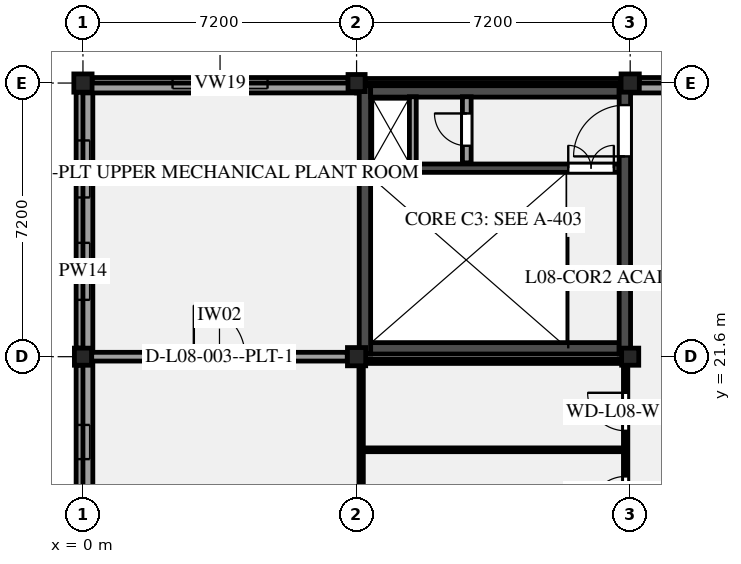
"""IFC4 building model, lengths in metres.
Left out: names, types, materials, properties, quantities, classifications, styles, units other than length and angle.
Written with IfcOpenShell. Run it as: python <this file> out.ifc"""

import sys

from ifc_helpers import new_model, si_unit, direction, frame, frame_2d, origin, origin_2d, place, context, subcontext, project, spatial, rectangle, extrude, element, fill, save


model = new_model("IFC4")
c1 = context("Model", 3, precision=1e-05, world=origin(), true_north=direction((0.0, 1.0)))
c2 = subcontext(c1, "Body", "Model", "MODEL_VIEW")
j1 = project(units=[si_unit("LENGTHUNIT", "METRE"), si_unit("PLANEANGLEUNIT", "RADIAN")], contexts=[c1])
p1 = place(None, origin())
s1 = spatial("IfcSite", under=j1, at=p1, CompositionType="ELEMENT")
p2 = place(p1, origin())
s2 = spatial("IfcBuilding", under=s1, at=p2, CompositionType="ELEMENT")
p3 = place(p2, frame((0.0, 0.0, 34.5)))
s3 = spatial("IfcBuildingStorey", under=s2, at=p3, CompositionType="ELEMENT", Elevation=34.5)
p4 = place(p3, frame((0.0, 21.6, 0.0), z_axis=(0.0, 0.0, 1.0), x_axis=(1.0, 0.0, 0.0)))
e1 = element("IfcColumn", 1, at=p4, inside=s3, PredefinedType="COLUMN", context=c2, shape_type="SweptSolid", body=[
    extrude(rectangle(XDim=0.45, YDim=0.45, at=origin_2d()), origin(), (0.0, 0.0, 1.0), 3.695),
])
for number, where, z_axis, x_axis in (
    (2, (0.0, 28.8, 0.0), (0.0, 0.0, 1.0), (1.0, 0.0, 0.0)),
    (3, (7.2, 21.6, 0.0), (0.0, 0.0, 1.0), (1.0, 0.0, 0.0)),
):
    element("IfcColumn", number, at=place(p3, frame(where, z_axis=z_axis, x_axis=x_axis)), inside=s3, PredefinedType="COLUMN", context=c2, shape_type="SweptSolid", body=[
        extrude(rectangle(XDim=0.48, YDim=0.48, at=origin_2d()), origin(), (0.0, 0.0, 1.0), 3.695),
    ])
for number, where, z_axis, x_axis in (
    (4, (7.2, 28.8, 0.0), (0.0, 0.0, 1.0), (1.0, 0.0, 0.0)),
    (5, (14.4, 21.6, 0.0), (0.0, 0.0, 1.0), (1.0, 0.0, 0.0)),
):
    element("IfcColumn", number, at=place(p3, frame(where, z_axis=z_axis, x_axis=x_axis)), inside=s3, PredefinedType="COLUMN", context=c2, shape_type="SweptSolid", body=[
        extrude(rectangle(XDim=0.45, YDim=0.45, at=origin_2d()), origin(), (0.0, 0.0, 1.0), 3.695),
    ])
p5 = place(p3, frame((14.4, 28.8, 0.0), z_axis=(0.0, 0.0, 1.0), x_axis=(1.0, 0.0, 0.0)))
e6 = element("IfcColumn", 6, at=p5, inside=s3, PredefinedType="COLUMN", context=c2, shape_type="SweptSolid", body=[
    extrude(rectangle(XDim=0.48, YDim=0.48, at=origin_2d()), origin(), (0.0, 0.0, 1.0), 3.695),
])
p6 = place(p3, frame((0.0, 14.64, 0.0), z_axis=(0.0, 0.0, 1.0), x_axis=(0.0, 1.0, 0.0)))
e7 = element("IfcWall", 7, at=p6, inside=s3, PredefinedType="STANDARD", context=c2, shape_type="SweptSolid", body=[
    extrude(rectangle(XDim=6.735, YDim=0.36, at=frame_2d((3.368, 0.0))), origin(), (0.0, 0.0, 1.0), 2.89),
])
p7 = place(p6, frame((1.571, 0.0, 1.15)))
e8 = element("IfcOpeningElement", 8, at=p7, cuts=e7, PredefinedType="OPENING", context=c2, shape_type="SweptSolid", body=[
    extrude(rectangle(XDim=0.9, YDim=1.3, at=frame_2d((0.45, 0.65))), frame((0.0, 0.19, 0.0), z_axis=(0.0, -1.0, 0.0), x_axis=(1.0, 0.0, 0.0)), (0.0, 0.0, 1.0), 0.38),
])
p8 = place(p6, frame((4.264, 0.0, 1.15)))
e9 = element("IfcOpeningElement", 9, at=p8, cuts=e7, PredefinedType="OPENING", context=c2, shape_type="SweptSolid", body=[
    extrude(rectangle(XDim=0.9, YDim=1.3, at=frame_2d((0.45, 0.65))), frame((0.0, 0.19, 0.0), z_axis=(0.0, -1.0, 0.0), x_axis=(1.0, 0.0, 0.0)), (0.0, 0.0, 1.0), 0.38),
])
p9 = place(p3, frame((0.0, 21.825, 0.0), z_axis=(0.0, 0.0, 1.0), x_axis=(0.0, 1.0, 0.0)))
e10 = element("IfcWall", 10, at=p9, inside=s3, PredefinedType="STANDARD", context=c2, shape_type="SweptSolid", body=[
    extrude(rectangle(XDim=6.735, YDim=0.36, at=frame_2d((3.368, 0.0))), origin(), (0.0, 0.0, 1.0), 2.89),
])
p10 = place(p9, frame((1.271, 0.0, 1.15)))
e11 = element("IfcOpeningElement", 11, at=p10, cuts=e10, PredefinedType="OPENING", context=c2, shape_type="SweptSolid", body=[
    extrude(rectangle(XDim=1.5, YDim=1.2, at=frame_2d((0.75, 0.6))), frame((0.0, 0.19, 0.0), z_axis=(0.0, -1.0, 0.0), x_axis=(1.0, 0.0, 0.0)), (0.0, 0.0, 1.0), 0.38),
])
p11 = place(p9, frame((3.965, 0.0, 1.15)))
e12 = element("IfcOpeningElement", 12, at=p11, cuts=e10, PredefinedType="OPENING", context=c2, shape_type="SweptSolid", body=[
    extrude(rectangle(XDim=1.5, YDim=1.2, at=frame_2d((0.75, 0.6))), frame((0.0, 0.19, 0.0), z_axis=(0.0, -1.0, 0.0), x_axis=(1.0, 0.0, 0.0)), (0.0, 0.0, 1.0), 0.38),
])
p12 = place(p3, frame((0.24, 28.8, 0.0), z_axis=(0.0, 0.0, 1.0), x_axis=(1.0, 0.0, 0.0)))
e13 = element("IfcWall", 13, at=p12, inside=s3, PredefinedType="STANDARD", context=c2, shape_type="SweptSolid", body=[
    extrude(rectangle(XDim=6.735, YDim=0.29, at=frame_2d((3.368, 0.0))), origin(), (0.0, 0.0, 1.0), 2.89),
])
p13 = place(p12, frame((2.117, 0.0, 0.98)))
e14 = element("IfcOpeningElement", 14, at=p13, cuts=e13, PredefinedType="OPENING", context=c2, shape_type="SweptSolid", body=[
    extrude(rectangle(XDim=2.5, YDim=1.35, at=frame_2d((1.25, 0.675))), frame((0.0, 0.155, 0.0), z_axis=(0.0, -1.0, 0.0), x_axis=(1.0, 0.0, 0.0)), (0.0, 0.0, 1.0), 0.31),
])
p14 = place(p3, frame((7.425, 28.8, 0.0), z_axis=(0.0, 0.0, 1.0), x_axis=(1.0, 0.0, 0.0)))
e15 = element("IfcWall", 15, at=p14, inside=s3, PredefinedType="STANDARD", context=c2, shape_type="SweptSolid", body=[
    extrude(rectangle(XDim=6.735, YDim=0.24, at=frame_2d((3.367, 0.0))), origin(), (0.0, 0.0, 1.0), 2.89),
])
p15 = place(p3, frame((14.64, 28.8, 0.0), z_axis=(0.0, 0.0, 1.0), x_axis=(1.0, 0.0, 0.0)))
e16 = element("IfcWall", 16, at=p15, inside=s3, PredefinedType="STANDARD", context=c2, shape_type="SweptSolid", body=[
    extrude(rectangle(XDim=6.735, YDim=0.29, at=frame_2d((3.368, 0.0))), origin(), (0.0, 0.0, 1.0), 2.89),
])
p16 = place(p15, frame((0.968, 0.0, 0.98)))
e17 = element("IfcOpeningElement", 17, at=p16, cuts=e16, PredefinedType="OPENING", context=c2, shape_type="SweptSolid", body=[
    extrude(rectangle(XDim=4.8, YDim=1.5, at=frame_2d((2.4, 0.75))), frame((0.0, 0.155, 0.0), z_axis=(0.0, -1.0, 0.0), x_axis=(1.0, 0.0, 0.0)), (0.0, 0.0, 1.0), 0.31),
])
p17 = place(p3, frame((0.13, 14.4, 3.695), z_axis=(0.0, 0.0, 1.0), x_axis=(0.0, 1.0, 0.0)))
e18 = element("IfcWall", 18, at=p17, inside=s3, PredefinedType="PARAPET", context=c2, shape_type="SweptSolid", body=[
    extrude(rectangle(XDim=7.2, YDim=0.26, at=frame_2d((3.6, 0.0))), origin(), (0.0, 0.0, 1.0), 1.105),
])
for number, where, z_axis, x_axis in (
    (19, (0.13, 21.6, 3.695), (0.0, 0.0, 1.0), (0.0, 1.0, 0.0)),
    (20, (0.0, 28.67, 3.695), (0.0, 0.0, 1.0), (1.0, 0.0, 0.0)),
):
    element("IfcWall", number, at=place(p3, frame(where, z_axis=z_axis, x_axis=x_axis)), inside=s3, PredefinedType="PARAPET", context=c2, shape_type="SweptSolid", body=[
        extrude(rectangle(XDim=7.2, YDim=0.26, at=frame_2d((3.6, 0.0))), origin(), (0.0, 0.0, 1.0), 1.105),
    ])
p18 = place(p3, frame((7.2, 28.67, 3.9), z_axis=(0.0, 0.0, 1.0), x_axis=(1.0, 0.0, 0.0)))
e21 = element("IfcWall", 21, at=p18, inside=s3, PredefinedType="PARAPET", context=c2, shape_type="SweptSolid", body=[
    extrude(rectangle(XDim=7.2, YDim=0.26, at=frame_2d((3.6, 0.0))), origin(), (0.0, 0.0, 1.0), 0.9),
])
p19 = place(p3, frame((14.4, 28.67, 3.695), z_axis=(0.0, 0.0, 1.0), x_axis=(1.0, 0.0, 0.0)))
e22 = element("IfcWall", 22, at=p19, inside=s3, PredefinedType="PARAPET", context=c2, shape_type="SweptSolid", body=[
    extrude(rectangle(XDim=7.2, YDim=0.26, at=frame_2d((3.6, 0.0))), origin(), (0.0, 0.0, 1.0), 1.105),
])
p20 = place(p3, frame((7.57, 21.82, 0.0), z_axis=(0.0, 0.0, 1.0), x_axis=(1.0, 0.0, 0.0)))
e23 = element("IfcWall", 23, at=p20, inside=s3, PredefinedType="SHEAR", context=c2, shape_type="SweptSolid", body=[
    extrude(rectangle(XDim=6.54, YDim=0.3, at=frame_2d((3.27, 0.0))), origin(), (0.0, 0.0, 1.0), 3.9),
])
p21 = place(p3, frame((7.42, 28.73, 0.0), z_axis=(0.0, 0.0, 1.0), x_axis=(0.0, -1.0, 0.0)))
e24 = element("IfcWall", 24, at=p21, inside=s3, PredefinedType="SHEAR", context=c2, shape_type="SweptSolid", body=[
    extrude(rectangle(XDim=7.06, YDim=0.3, at=frame_2d((3.53, 0.0))), origin(), (0.0, 0.0, 1.0), 3.9),
])
p22 = place(p3, frame((7.57, 28.58, 0.0), z_axis=(0.0, 0.0, 1.0), x_axis=(1.0, 0.0, 0.0)))
e25 = element("IfcWall", 25, at=p22, inside=s3, PredefinedType="SHEAR", context=c2, shape_type="SweptSolid", body=[
    extrude(rectangle(XDim=6.54, YDim=0.3, at=frame_2d((3.27, 0.0))), origin(), (0.0, 0.0, 1.0), 3.9),
])
p23 = place(p3, frame((7.57, 26.56, 0.0), z_axis=(0.0, 0.0, 1.0), x_axis=(1.0, 0.0, 0.0)))
e26 = element("IfcWall", 26, at=p23, inside=s3, PredefinedType="SHEAR", context=c2, shape_type="SweptSolid", body=[
    extrude(rectangle(XDim=6.54, YDim=0.22, at=frame_2d((3.27, 0.0))), origin(), (0.0, 0.0, 1.0), 3.9),
])
p24 = place(p23, frame((5.2, 0.0, 0.0)))
e27 = element("IfcOpeningElement", 27, at=p24, cuts=e26, PredefinedType="OPENING", context=c2, shape_type="SweptSolid", body=[
    extrude(rectangle(XDim=1.2, YDim=2.2, at=frame_2d((0.6, 1.1))), frame((0.0, 0.12, 0.0), z_axis=(0.0, -1.0, 0.0), x_axis=(1.0, 0.0, 0.0)), (0.0, 0.0, 1.0), 0.24),
])
p25 = place(p3, frame((10.1, 26.7, 0.0), z_axis=(0.0, 0.0, 1.0), x_axis=(0.0, 1.0, 0.0)))
e28 = element("IfcWall", 28, at=p25, inside=s3, PredefinedType="PARTITIONING", context=c2, shape_type="SweptSolid", body=[
    extrude(rectangle(XDim=1.74, YDim=0.23, at=frame_2d((0.87, 0.0))), origin(), (0.0, 0.0, 1.0), 3.9),
])
p26 = place(p25, frame((0.45, 0.0, 0.0)))
e29 = element("IfcOpeningElement", 29, at=p26, cuts=e28, PredefinedType="OPENING", context=c2, shape_type="SweptSolid", body=[
    extrude(rectangle(XDim=0.85, YDim=2.1, at=frame_2d((0.425, 1.05))), frame((0.0, 0.125, 0.0), z_axis=(0.0, -1.0, 0.0), x_axis=(1.0, 0.0, 0.0)), (0.0, 0.0, 1.0), 0.25),
])
p27 = place(p3, frame((8.68, 26.68, 0.0), z_axis=(0.0, 0.0, 1.0), x_axis=(0.0, 1.0, 0.0)))
e30 = element("IfcWall", 30, at=p27, inside=s3, PredefinedType="PARTITIONING", context=c2, shape_type="SweptSolid", body=[
    extrude(rectangle(XDim=1.76, YDim=0.18, at=frame_2d((0.88, 0.0))), origin(), (0.0, 0.0, 1.0), 3.9),
])
p28 = place(p3, frame((14.26, 21.67, 0.0), z_axis=(0.0, 0.0, 1.0), x_axis=(0.0, 1.0, 0.0)))
e31 = element("IfcWall", 31, at=p28, inside=s3, PredefinedType="SHEAR", context=c2, shape_type="SweptSolid", body=[
    extrude(rectangle(XDim=7.06, YDim=0.3, at=frame_2d((3.53, 0.0))), origin(), (0.0, 0.0, 1.0), 3.9),
])
p29 = place(p28, frame((5.2, 0.0, 0.0)))
e32 = element("IfcOpeningElement", 32, at=p29, cuts=e31, PredefinedType="OPENING", context=c2, shape_type="SweptSolid", body=[
    extrude(rectangle(XDim=1.35, YDim=2.15, at=frame_2d((0.675, 1.075))), frame((0.0, 0.16, 0.0), z_axis=(0.0, -1.0, 0.0), x_axis=(1.0, 0.0, 0.0)), (0.0, 0.0, 1.0), 0.32),
])
p30 = place(p3, frame((7.445, 21.48, 0.0), z_axis=(0.0, 0.0, 1.0), x_axis=(1.0, 0.0, 0.0)))
e33 = element("IfcWall", 33, at=p30, inside=s3, PredefinedType="PARTITIONING", context=c2, shape_type="SweptSolid", body=[
    extrude(rectangle(XDim=6.725, YDim=0.115, at=frame_2d((3.362, 0.0))), origin(), (0.0, 0.0, 1.0), 2.89),
])
p31 = place(p3, frame((7.32, 14.63, 0.0), z_axis=(0.0, 0.0, 1.0), x_axis=(0.0, 1.0, 0.0)))
e34 = element("IfcWall", 34, at=p31, inside=s3, PredefinedType="PARTITIONING", context=c2, shape_type="SweptSolid", body=[
    extrude(rectangle(XDim=6.725, YDim=0.115, at=frame_2d((3.363, 0.0))), origin(), (0.0, 0.0, 1.0), 2.89),
])
p32 = place(p3, frame((14.28, 14.645, 0.0), z_axis=(0.0, 0.0, 1.0), x_axis=(0.0, 1.0, 0.0)))
e35 = element("IfcWall", 35, at=p32, inside=s3, PredefinedType="PARTITIONING", context=c2, shape_type="SweptSolid", body=[
    extrude(rectangle(XDim=6.725, YDim=0.115, at=frame_2d((3.363, 0.0))), origin(), (0.0, 0.0, 1.0), 2.89),
])
p33 = place(p32, frame((0.755, 0.0, 0.0)))
e36 = element("IfcOpeningElement", 36, at=p33, cuts=e35, PredefinedType="OPENING", context=c2, shape_type="SweptSolid", body=[
    extrude(rectangle(XDim=0.95, YDim=2.1, at=frame_2d((0.475, 1.05))), frame((0.0, 0.067, 0.0), z_axis=(0.0, -1.0, 0.0), x_axis=(1.0, 0.0, 0.0)), (0.0, 0.0, 1.0), 0.135),
])
p34 = place(p32, frame((2.855, 0.0, 0.0)))
e37 = element("IfcOpeningElement", 37, at=p34, cuts=e35, PredefinedType="OPENING", context=c2, shape_type="SweptSolid", body=[
    extrude(rectangle(XDim=0.95, YDim=2.1, at=frame_2d((0.475, 1.05))), frame((0.0, 0.067, 0.0), z_axis=(0.0, -1.0, 0.0), x_axis=(1.0, 0.0, 0.0)), (0.0, 0.0, 1.0), 0.135),
])
p35 = place(p32, frame((5.005, 0.0, 0.0)))
e38 = element("IfcOpeningElement", 38, at=p35, cuts=e35, PredefinedType="OPENING", context=c2, shape_type="SweptSolid", body=[
    extrude(rectangle(XDim=1.0, YDim=2.15, at=frame_2d((0.5, 1.075))), frame((0.0, 0.067, 0.0), z_axis=(0.0, -1.0, 0.0), x_axis=(1.0, 0.0, 0.0)), (0.0, 0.0, 1.0), 0.135),
])
p36 = place(p3, frame((7.4, 19.15, 0.0), z_axis=(0.0, 0.0, 1.0), x_axis=(1.0, 0.0, 0.0)))
e39 = element("IfcWall", 39, at=p36, inside=s3, PredefinedType="PARTITIONING", context=c2, shape_type="SweptSolid", body=[
    extrude(rectangle(XDim=6.8, YDim=0.1, at=frame_2d((3.4, 0.0))), origin(), (0.0, 0.0, 1.0), 3.9),
])
p37 = place(p3, frame((0.23, 21.6, 0.0), z_axis=(0.0, 0.0, 1.0), x_axis=(1.0, 0.0, 0.0)))
e40 = element("IfcWall", 40, at=p37, inside=s3, PredefinedType="PARTITIONING", context=c2, shape_type="SweptSolid", body=[
    extrude(rectangle(XDim=6.725, YDim=0.23, at=frame_2d((3.363, 0.0))), origin(), (0.0, 0.0, 1.0), 2.89),
])
p38 = place(p37, frame((2.688, 0.0, 0.0)))
e41 = element("IfcOpeningElement", 41, at=p38, cuts=e40, PredefinedType="OPENING", context=c2, shape_type="SweptSolid", body=[
    extrude(rectangle(XDim=1.35, YDim=2.15, at=frame_2d((0.675, 1.075))), frame((0.0, 0.125, 0.0), z_axis=(0.0, -1.0, 0.0), x_axis=(1.0, 0.0, 0.0)), (0.0, 0.0, 1.0), 0.25),
])
p39 = place(p8, origin())
e42 = element("IfcWindow", 42, at=p39, inside=s3, PartitioningType="SINGLE_PANEL", PredefinedType="WINDOW", context=c2, shape_type="SweptSolid", body=[
    extrude(rectangle(XDim=0.9, YDim=1.3, at=frame_2d((0.45, 0.65))), frame((0.0, -0.08, 0.0), z_axis=(0.0, -1.0, 0.0), x_axis=(1.0, 0.0, 0.0)), (0.0, 0.0, 1.0), 0.06),
])
fill(e9, e42)
p40 = place(p10, origin())
e43 = element("IfcWindow", 43, at=p40, inside=s3, PartitioningType="SINGLE_PANEL", PredefinedType="WINDOW", context=c2, shape_type="SweptSolid", body=[
    extrude(rectangle(XDim=1.5, YDim=1.2, at=frame_2d((0.75, 0.6))), frame((0.0, -0.08, 0.0), z_axis=(0.0, -1.0, 0.0), x_axis=(1.0, 0.0, 0.0)), (0.0, 0.0, 1.0), 0.06),
])
fill(e11, e43)
p41 = place(p11, origin())
e44 = element("IfcWindow", 44, at=p41, inside=s3, PartitioningType="SINGLE_PANEL", PredefinedType="WINDOW", context=c2, shape_type="SweptSolid", body=[
    extrude(rectangle(XDim=1.5, YDim=1.2, at=frame_2d((0.75, 0.6))), frame((0.0, -0.08, 0.0), z_axis=(0.0, -1.0, 0.0), x_axis=(1.0, 0.0, 0.0)), (0.0, 0.0, 1.0), 0.06),
])
fill(e12, e44)
p42 = place(p13, origin())
e45 = element("IfcWindow", 45, at=p42, inside=s3, PartitioningType="SINGLE_PANEL", PredefinedType="WINDOW", context=c2, shape_type="SweptSolid", body=[
    extrude(rectangle(XDim=2.5, YDim=1.35, at=frame_2d((1.25, 0.675))), frame((0.0, -0.03, 0.0), z_axis=(0.0, -1.0, 0.0), x_axis=(1.0, 0.0, 0.0)), (0.0, 0.0, 1.0), 0.06),
])
fill(e14, e45)
p43 = place(p26, origin())
e46 = element("IfcDoor", 46, at=p43, inside=s3, OperationType="SINGLE_SWING_RIGHT", PredefinedType="DOOR", context=c2, shape_type="SweptSolid", body=[
    extrude(rectangle(XDim=0.85, YDim=2.1, at=frame_2d((0.425, 1.05))), frame((0.0, 0.025, 0.0), z_axis=(0.0, -1.0, 0.0), x_axis=(1.0, 0.0, 0.0)), (0.0, 0.0, 1.0), 0.05),
])
fill(e29, e46)
p44 = place(p24, origin())
e47 = element("IfcDoor", 47, at=p44, inside=s3, OperationType="DOUBLE_DOOR_SINGLE_SWING", PredefinedType="DOOR", context=c2, shape_type="SweptSolid", body=[
    extrude(rectangle(XDim=1.2, YDim=2.2, at=frame_2d((0.6, 1.1))), frame((0.0, 0.025, 0.0), z_axis=(0.0, -1.0, 0.0), x_axis=(1.0, 0.0, 0.0)), (0.0, 0.0, 1.0), 0.05),
])
fill(e27, e47)
p45 = place(p29, origin())
e48 = element("IfcDoor", 48, at=p45, inside=s3, OperationType="SINGLE_SWING_LEFT", PredefinedType="DOOR", context=c2, shape_type="SweptSolid", body=[
    extrude(rectangle(XDim=1.35, YDim=2.15, at=frame_2d((0.675, 1.075))), frame((0.0, 0.025, 0.0), z_axis=(0.0, -1.0, 0.0), x_axis=(1.0, 0.0, 0.0)), (0.0, 0.0, 1.0), 0.05),
])
fill(e32, e48)
p46 = place(p34, origin())
e49 = element("IfcDoor", 49, at=p46, inside=s3, OperationType="SINGLE_SWING_LEFT", PredefinedType="DOOR", context=c2, shape_type="SweptSolid", body=[
    extrude(rectangle(XDim=0.95, YDim=2.1, at=frame_2d((0.475, 1.05))), frame((0.0, 0.025, 0.0), z_axis=(0.0, -1.0, 0.0), x_axis=(1.0, 0.0, 0.0)), (0.0, 0.0, 1.0), 0.05),
])
fill(e37, e49)
p47 = place(p35, origin())
e50 = element("IfcDoor", 50, at=p47, inside=s3, OperationType="SINGLE_SWING_RIGHT", PredefinedType="DOOR", context=c2, shape_type="SweptSolid", body=[
    extrude(rectangle(XDim=1.0, YDim=2.15, at=frame_2d((0.5, 1.075))), frame((0.0, 0.025, 0.0), z_axis=(0.0, -1.0, 0.0), x_axis=(1.0, 0.0, 0.0)), (0.0, 0.0, 1.0), 0.05),
])
fill(e38, e50)
p48 = place(p38, origin())
e51 = element("IfcDoor", 51, at=p48, inside=s3, OperationType="SINGLE_SWING_LEFT", PredefinedType="DOOR", context=c2, shape_type="SweptSolid", body=[
    extrude(rectangle(XDim=1.35, YDim=2.15, at=frame_2d((0.675, 1.075))), frame((0.0, 0.025, 0.0), z_axis=(0.0, -1.0, 0.0), x_axis=(1.0, 0.0, 0.0)), (0.0, 0.0, 1.0), 0.05),
])
fill(e41, e51)
save(model, sys.argv[1])
